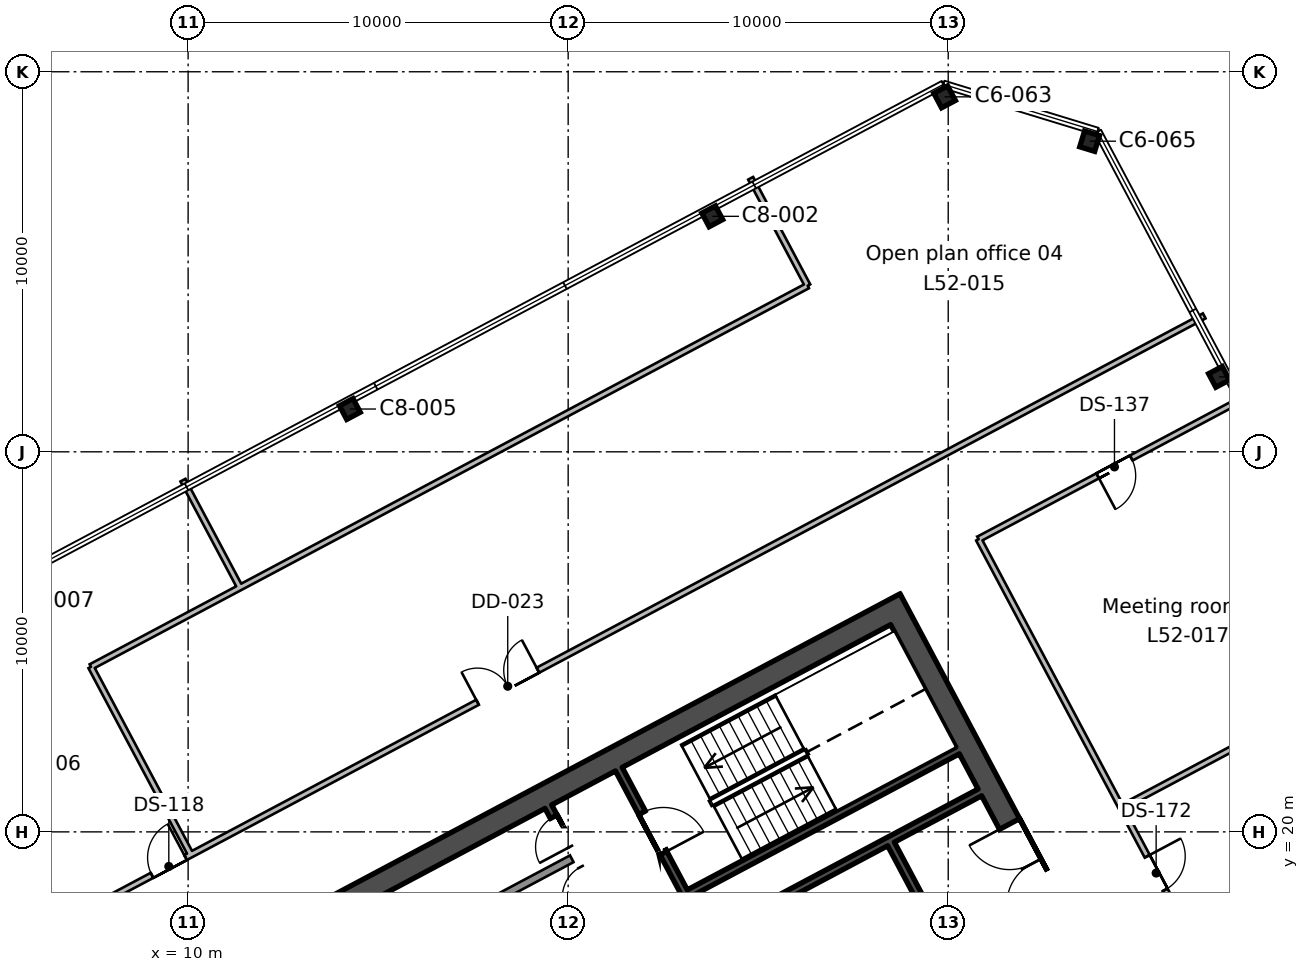
"""IFC4 building model, lengths in metres.
Left out: names, types, materials, properties, quantities, classifications, styles, units other than length and angle.
Written with IfcOpenShell. Run it as: python <this file> out.ifc"""

import sys

from ifc_helpers import new_model, si_unit, direction, frame, frame_2d, origin, origin_2d, place, context, subcontext, project, spatial, rectangle, i_section, extrude, element, fill, save


model = new_model("IFC4")
c1 = context("Model", 3, precision=1e-05, world=origin(), true_north=direction((0.0, 1.0)))
c2 = subcontext(c1, "Body", "Model", "MODEL_VIEW")
j1 = project(units=[si_unit("LENGTHUNIT", "METRE"), si_unit("PLANEANGLEUNIT", "RADIAN")], contexts=[c1])
p1 = place(None, origin())
s1 = spatial("IfcSite", under=j1, at=p1, CompositionType="ELEMENT")
p2 = place(p1, origin())
s2 = spatial("IfcBuilding", under=s1, at=p2, CompositionType="ELEMENT")
p3 = place(p2, frame((0.0, 0.0, 236.4)))
s3 = spatial("IfcBuildingStorey", under=s2, at=p3, CompositionType="ELEMENT", Elevation=236.4)
for number, where, z_axis, x_axis in (
    (1, (14.256, 31.126, 0.0), (0.0, 0.0, 1.0), (-0.883, -0.469, 0.0)),
    (2, (37.126, 31.972, 0.0), (0.0, 0.0, 1.0), (-0.469, 0.883, 0.0)),
    (3, (23.792, 36.196, 0.0), (0.0, 0.0, 1.0), (-0.883, -0.469, 0.0)),
):
    element("IfcColumn", number, at=place(p3, frame(where, z_axis=z_axis, x_axis=x_axis)), inside=s3, PredefinedType="COLUMN", context=c2, shape_type="SweptSolid", body=[
        extrude(i_section(OverallWidth=0.404, OverallDepth=0.406, WebThickness=0.027, FlangeThickness=0.044, FilletRadius=0.015, at=origin_2d()), origin(), (0.0, 0.0, 1.0), 3.9),
    ])
for number, where, z_axis, x_axis in (
    (4, (33.721, 38.173, 0.0), (0.0, 0.0, 1.0), (-0.956, 0.292, 0.0)),
    (5, (29.905, 39.34, 0.0), (0.0, 0.0, 1.0), (-0.883, -0.469, 0.0)),
):
    element("IfcColumn", number, at=place(p3, frame(where, z_axis=z_axis, x_axis=x_axis)), inside=s3, PredefinedType="COLUMN", context=c2, shape_type="SweptSolid", body=[
        extrude(i_section(OverallWidth=0.412, OverallDepth=0.434, WebThickness=0.036, FlangeThickness=0.057, FilletRadius=0.015, at=origin_2d()), origin(), (0.0, 0.0, 1.0), 3.9),
    ])
p4 = place(p3, frame((37.576, 8.994, 0.0), z_axis=(0.0, 0.0, 1.0), x_axis=(-0.469478769487, 0.88294376095, 0.0)))
e6 = element("IfcWall", 6, at=p4, inside=s3, PredefinedType="SHEAR", context=c2, shape_type="SweptSolid", body=[
    extrude(rectangle(XDim=19.4, YDim=0.6, at=frame_2d((9.7, 0.0))), origin(), (0.0, 0.0, 1.0), 3.9),
])
p5 = place(p4, frame((10.3, 0.0, 0.0)))
e7 = element("IfcOpeningElement", 7, at=p5, cuts=e6, PredefinedType="OPENING", context=c2, shape_type="SweptSolid", body=[
    extrude(rectangle(XDim=2.4, YDim=2.4, at=frame_2d((1.2, 1.2))), frame((0.0, 0.31, 0.0), z_axis=(0.0, -1.0, 0.0), x_axis=(1.0, 0.0, 0.0)), (0.0, 0.0, 1.0), 0.62),
])
p6 = place(p3, frame((10.509, 16.234, 0.0), z_axis=(0.0, 0.0, 1.0), x_axis=(0.88295010195, 0.469466843842, 0.0)))
e8 = element("IfcWall", 8, at=p6, inside=s3, PredefinedType="SHEAR", context=c2, shape_type="SweptSolid", body=[
    extrude(rectangle(XDim=20.2, YDim=0.6, at=frame_2d((10.1, 0.0))), origin(), (0.0, 0.0, 1.0), 3.9),
])
p7 = place(p3, frame((22.906, 14.218, 0.0), z_axis=(0.0, 0.0, 1.0), x_axis=(-0.469480409012, 0.88294288918, 0.0)))
e9 = element("IfcWall", 9, at=p7, inside=s3, PredefinedType="SHEAR", context=c2, shape_type="SweptSolid", body=[
    extrude(rectangle(XDim=7.3, YDim=0.2, at=frame_2d((3.65, 0.0))), origin(), (0.0, 0.0, 1.0), 3.9),
])
p8 = place(p7, frame((2.85, 0.0, 0.0)))
e10 = element("IfcOpeningElement", 10, at=p8, cuts=e9, PredefinedType="OPENING", context=c2, shape_type="SweptSolid", body=[
    extrude(rectangle(XDim=0.9, YDim=2.1, at=frame_2d((0.45, 1.05))), frame((0.0, 0.11, 0.0), z_axis=(0.0, -1.0, 0.0), x_axis=(1.0, 0.0, 0.0)), (0.0, 0.0, 1.0), 0.22),
])
p9 = place(p7, frame((4.6, 0.0, 0.0)))
e11 = element("IfcOpeningElement", 11, at=p9, cuts=e9, PredefinedType="OPENING", context=c2, shape_type="SweptSolid", body=[
    extrude(rectangle(XDim=0.9, YDim=2.1, at=frame_2d((0.45, 1.05))), frame((0.0, 0.11, 0.0), z_axis=(0.0, -1.0, 0.0), x_axis=(1.0, 0.0, 0.0)), (0.0, 0.0, 1.0), 0.22),
])
p10 = place(p7, frame((6.1, 0.0, 0.0)))
e12 = element("IfcOpeningElement", 12, at=p10, cuts=e9, PredefinedType="OPENING", context=c2, shape_type="SweptSolid", body=[
    extrude(rectangle(XDim=0.9, YDim=2.1, at=frame_2d((0.45, 1.05))), frame((0.0, 0.11, 0.0), z_axis=(0.0, -1.0, 0.0), x_axis=(1.0, 0.0, 0.0)), (0.0, 0.0, 1.0), 0.22),
])
p11 = place(p3, frame((24.76, 15.204, 0.0), z_axis=(0.0, 0.0, 1.0), x_axis=(-0.469494272526, 0.882935517501, 0.0)))
e13 = element("IfcWall", 13, at=p11, inside=s3, PredefinedType="SHEAR", context=c2, shape_type="SweptSolid", body=[
    extrude(rectangle(XDim=7.3, YDim=0.2, at=frame_2d((3.65, 0.0))), origin(), (0.0, 0.0, 1.0), 3.9),
])
p12 = place(p11, frame((4.8, 0.0, 0.0)))
e14 = element("IfcOpeningElement", 14, at=p12, cuts=e13, PredefinedType="OPENING", context=c2, shape_type="SweptSolid", body=[
    extrude(rectangle(XDim=1.2, YDim=2.1, at=frame_2d((0.6, 1.05))), frame((0.0, 0.11, 0.0), z_axis=(0.0, -1.0, 0.0), x_axis=(1.0, 0.0, 0.0)), (0.0, 0.0, 1.0), 0.22),
])
p13 = place(p3, frame((29.528, 17.739, 0.0), z_axis=(0.0, 0.0, 1.0), x_axis=(-0.469401318492, 0.882984938828, 0.0)))
e15 = element("IfcWall", 15, at=p13, inside=s3, PredefinedType="SHEAR", context=c2, shape_type="SweptSolid", body=[
    extrude(rectangle(XDim=2.2, YDim=0.2, at=frame_2d((1.1, 0.0))), origin(), (0.0, 0.0, 1.0), 3.9),
])
p14 = place(p3, frame((23.769, 17.282, 0.0), z_axis=(0.0, 0.0, 1.0), x_axis=(0.882940221191, 0.469485426614, 0.0)))
e16 = element("IfcWall", 16, at=p14, inside=s3, PredefinedType="SHEAR", context=c2, shape_type="SweptSolid", body=[
    extrude(rectangle(XDim=8.0, YDim=0.2, at=frame_2d((4.0, 0.0))), origin(), (0.0, 0.0, 1.0), 3.9),
])
p15 = place(p3, frame((23.182, 18.385, 0.0), z_axis=(0.0, 0.0, 1.0), x_axis=(0.88295287151, 0.469461634952, 0.0)))
e17 = element("IfcWall", 17, at=p15, inside=s3, PredefinedType="SHEAR", context=c2, shape_type="SweptSolid", body=[
    extrude(rectangle(XDim=8.0, YDim=0.2, at=frame_2d((4.0, 0.0))), origin(), (0.0, 0.0, 1.0), 3.9),
])
p16 = place(p3, frame((15.504, 16.851, 0.0), z_axis=(0.0, 0.0, 1.0), x_axis=(0.882953967957, 0.469459572775, 0.0)))
e18 = element("IfcWall", 18, at=p16, inside=s3, PredefinedType="SOLIDWALL", context=c2, shape_type="SweptSolid", body=[
    extrude(rectangle(XDim=5.2, YDim=0.2, at=frame_2d((2.6, 0.0))), origin(), (0.0, 0.0, 1.0), 3.9),
])
p17 = place(p3, frame((0.0, 14.044, 0.0), z_axis=(0.0, 0.0, 1.0), x_axis=(0.882962129795, 0.469444221764, 0.0)))
e19 = element("IfcWall", 19, at=p17, inside=s3, PredefinedType="PARTITIONING", context=c2, shape_type="SweptSolid", body=[
    extrude(rectangle(XDim=41.607, YDim=0.15, at=frame_2d((20.803, 0.0))), origin(), (0.0, 0.0, 1.0), 3.54),
])
p18 = place(p17, frame((19.95, 0.0, 0.0)))
e20 = element("IfcOpeningElement", 20, at=p18, cuts=e19, PredefinedType="OPENING", context=c2, shape_type="SweptSolid", body=[
    extrude(rectangle(XDim=1.8, YDim=2.1, at=frame_2d((0.9, 1.05))), frame((0.0, 0.085, 0.0), z_axis=(0.0, -1.0, 0.0), x_axis=(1.0, 0.0, 0.0)), (0.0, 0.0, 1.0), 0.17),
])
p19 = place(p17, frame((10.25, 0.0, 0.0)))
e21 = element("IfcOpeningElement", 21, at=p19, cuts=e19, PredefinedType="OPENING", context=c2, shape_type="SweptSolid", body=[
    extrude(rectangle(XDim=1.0, YDim=2.1, at=frame_2d((0.5, 1.05))), frame((0.0, 0.085, 0.0), z_axis=(0.0, -1.0, 0.0), x_axis=(1.0, 0.0, 0.0)), (0.0, 0.0, 1.0), 0.17),
])
p20 = place(p3, frame((11.355, 26.424, 0.0), z_axis=(0.0, 0.0, 1.0), x_axis=(-0.882846627183, -0.469661402366, 0.0)))
e22 = element("IfcWall", 22, at=p20, inside=s3, PredefinedType="PARTITIONING", context=c2, shape_type="SweptSolid", body=[
    extrude(rectangle(XDim=4.431, YDim=0.15, at=frame_2d((2.215, 0.0))), origin(), (0.0, 0.0, 1.0), 3.54),
])
p21 = place(p3, frame((7.443, 24.343, 0.0), z_axis=(0.0, 0.0, 1.0), x_axis=(0.46941499577, -0.88297766775, 0.0)))
e23 = element("IfcWall", 23, at=p21, inside=s3, PredefinedType="PARTITIONING", context=c2, shape_type="SweptSolid", body=[
    extrude(rectangle(XDim=5.543, YDim=0.15, at=frame_2d((2.771, 0.0))), origin(), (0.0, 0.0, 1.0), 3.54),
])
p22 = place(p3, frame((9.864, 29.255, 0.0), z_axis=(0.0, 0.0, 1.0), x_axis=(0.469447181805, -0.882960556025, 0.0)))
e24 = element("IfcWall", 24, at=p22, inside=s3, PredefinedType="PARTITIONING", context=c2, shape_type="SweptSolid", body=[
    extrude(rectangle(XDim=3.199, YDim=0.15, at=frame_2d((1.6, 0.0))), origin(), (0.0, 0.0, 1.0), 3.54),
])
p23 = place(p3, frame((11.355, 26.424, 0.0), z_axis=(0.0, 0.0, 1.0), x_axis=(0.882971344108, 0.469426890458, 0.0)))
e25 = element("IfcWall", 25, at=p23, inside=s3, PredefinedType="PARTITIONING", context=c2, shape_type="SweptSolid", body=[
    extrude(rectangle(XDim=16.929, YDim=0.15, at=frame_2d((8.465, 0.0))), origin(), (0.0, 0.0, 1.0), 3.54),
])
p24 = place(p3, frame((26.303, 34.371, 0.0), z_axis=(0.0, 0.0, 1.0), x_axis=(-0.46919425931, 0.883094981885, 0.0)))
e26 = element("IfcWall", 26, at=p24, inside=s3, PredefinedType="PARTITIONING", context=c2, shape_type="SweptSolid", body=[
    extrude(rectangle(XDim=3.201, YDim=0.15, at=frame_2d((1.601, 0.0))), origin(), (0.0, 0.0, 1.0), 3.54),
])
p25 = place(p3, frame((37.863, 31.458, 0.0), z_axis=(0.0, 0.0, 1.0), x_axis=(-0.882914115089, -0.469534519898, 0.0)))
e27 = element("IfcWall", 27, at=p25, inside=s3, PredefinedType="PARTITIONING", context=c2, shape_type="SweptSolid", body=[
    extrude(rectangle(XDim=8.0, YDim=0.15, at=frame_2d((4.0, 0.0))), origin(), (0.0, 0.0, 1.0), 3.54),
])
p26 = place(p25, frame((3.451, 0.0, 0.0)))
e28 = element("IfcOpeningElement", 28, at=p26, cuts=e27, PredefinedType="OPENING", context=c2, shape_type="SweptSolid", body=[
    extrude(rectangle(XDim=1.0, YDim=2.1, at=frame_2d((0.5, 1.05))), frame((0.0, 0.085, 0.0), z_axis=(0.0, -1.0, 0.0), x_axis=(1.0, 0.0, 0.0)), (0.0, 0.0, 1.0), 0.17),
])
p27 = place(p3, frame((30.8, 27.702, 0.0), z_axis=(0.0, 0.0, 1.0), x_axis=(0.469451816494, -0.882958091865, 0.0)))
e29 = element("IfcWall", 29, at=p27, inside=s3, PredefinedType="PARTITIONING", context=c2, shape_type="SweptSolid", body=[
    extrude(rectangle(XDim=20.0, YDim=0.15, at=frame_2d((10.0, 0.0))), origin(), (0.0, 0.0, 1.0), 3.54),
])
p28 = place(p27, frame((9.45, 0.0, 0.0)))
e30 = element("IfcOpeningElement", 30, at=p28, cuts=e29, PredefinedType="OPENING", context=c2, shape_type="SweptSolid", body=[
    extrude(rectangle(XDim=1.0, YDim=2.1, at=frame_2d((0.5, 1.05))), frame((0.0, 0.085, 0.0), z_axis=(0.0, -1.0, 0.0), x_axis=(1.0, 0.0, 0.0)), (0.0, 0.0, 1.0), 0.17),
])
p29 = place(p3, frame((41.619, 24.395, 0.0), z_axis=(0.0, 0.0, 1.0), x_axis=(-0.882914115089, -0.469534519898, 0.0)))
e31 = element("IfcWall", 31, at=p29, inside=s3, PredefinedType="PARTITIONING", context=c2, shape_type="SweptSolid", body=[
    extrude(rectangle(XDim=8.0, YDim=0.15, at=frame_2d((4.0, 0.0))), origin(), (0.0, 0.0, 1.0), 3.54),
])
p30 = place(p5, origin())
e32 = element("IfcDoor", 32, at=p30, inside=s3, OperationType="DOUBLE_DOOR_SINGLE_SWING", PredefinedType="DOOR", context=c2, shape_type="SweptSolid", body=[
    extrude(rectangle(XDim=2.4, YDim=2.4, at=frame_2d((1.2, 1.2))), frame((0.0, 0.025, 0.0), z_axis=(0.0, -1.0, 0.0), x_axis=(1.0, 0.0, 0.0)), (0.0, 0.0, 1.0), 0.05),
])
fill(e7, e32)
p31 = place(p12, frame((1.2, 0.0, 0.0), z_axis=(0.0, 0.0, 1.0), x_axis=(-1.0, 0.0, 0.0)))
e33 = element("IfcDoor", 33, at=p31, inside=s3, OperationType="SINGLE_SWING_RIGHT", PredefinedType="DOOR", context=c2, shape_type="SweptSolid", body=[
    extrude(rectangle(XDim=1.2, YDim=2.1, at=frame_2d((0.6, 1.05))), frame((0.0, 0.025, 0.0), z_axis=(0.0, -1.0, 0.0), x_axis=(1.0, 0.0, 0.0)), (0.0, 0.0, 1.0), 0.05),
])
fill(e14, e33)
p32 = place(p9, origin())
e34 = element("IfcDoor", 34, at=p32, inside=s3, OperationType="SINGLE_SWING_LEFT", PredefinedType="DOOR", context=c2, shape_type="SweptSolid", body=[
    extrude(rectangle(XDim=0.9, YDim=2.1, at=frame_2d((0.45, 1.05))), frame((0.0, 0.025, 0.0), z_axis=(0.0, -1.0, 0.0), x_axis=(1.0, 0.0, 0.0)), (0.0, 0.0, 1.0), 0.05),
])
fill(e11, e34)
p33 = place(p10, origin())
e35 = element("IfcDoor", 35, at=p33, inside=s3, OperationType="SINGLE_SWING_LEFT", PredefinedType="DOOR", context=c2, shape_type="SweptSolid", body=[
    extrude(rectangle(XDim=0.9, YDim=2.1, at=frame_2d((0.45, 1.05))), frame((0.0, 0.025, 0.0), z_axis=(0.0, -1.0, 0.0), x_axis=(1.0, 0.0, 0.0)), (0.0, 0.0, 1.0), 0.05),
])
fill(e12, e35)
p34 = place(p18, origin())
e36 = element("IfcDoor", 36, at=p34, inside=s3, OperationType="DOUBLE_DOOR_SINGLE_SWING", PredefinedType="DOOR", context=c2, shape_type="SweptSolid", body=[
    extrude(rectangle(XDim=1.8, YDim=2.1, at=frame_2d((0.9, 1.05))), frame((0.0, 0.025, 0.0), z_axis=(0.0, -1.0, 0.0), x_axis=(1.0, 0.0, 0.0)), (0.0, 0.0, 1.0), 0.05),
])
fill(e20, e36)
p35 = place(p19, origin())
e37 = element("IfcDoor", 37, at=p35, inside=s3, OperationType="SINGLE_SWING_RIGHT", PredefinedType="DOOR", context=c2, shape_type="SweptSolid", body=[
    extrude(rectangle(XDim=1.0, YDim=2.1, at=frame_2d((0.5, 1.05))), frame((0.0, 0.025, 0.0), z_axis=(0.0, -1.0, 0.0), x_axis=(1.0, 0.0, 0.0)), (0.0, 0.0, 1.0), 0.05),
])
fill(e21, e37)
p36 = place(p28, origin())
e38 = element("IfcDoor", 38, at=p36, inside=s3, OperationType="SINGLE_SWING_LEFT", PredefinedType="DOOR", context=c2, shape_type="SweptSolid", body=[
    extrude(rectangle(XDim=1.0, YDim=2.1, at=frame_2d((0.5, 1.05))), frame((0.0, 0.025, 0.0), z_axis=(0.0, -1.0, 0.0), x_axis=(1.0, 0.0, 0.0)), (0.0, 0.0, 1.0), 0.05),
])
fill(e30, e38)
p37 = place(p26, origin())
e39 = element("IfcDoor", 39, at=p37, inside=s3, OperationType="SINGLE_SWING_RIGHT", PredefinedType="DOOR", context=c2, shape_type="SweptSolid", body=[
    extrude(rectangle(XDim=1.0, YDim=2.1, at=frame_2d((0.5, 1.05))), frame((0.0, 0.025, 0.0), z_axis=(0.0, -1.0, 0.0), x_axis=(1.0, 0.0, 0.0)), (0.0, 0.0, 1.0), 0.05),
])
fill(e28, e39)
save(model, sys.argv[1])
